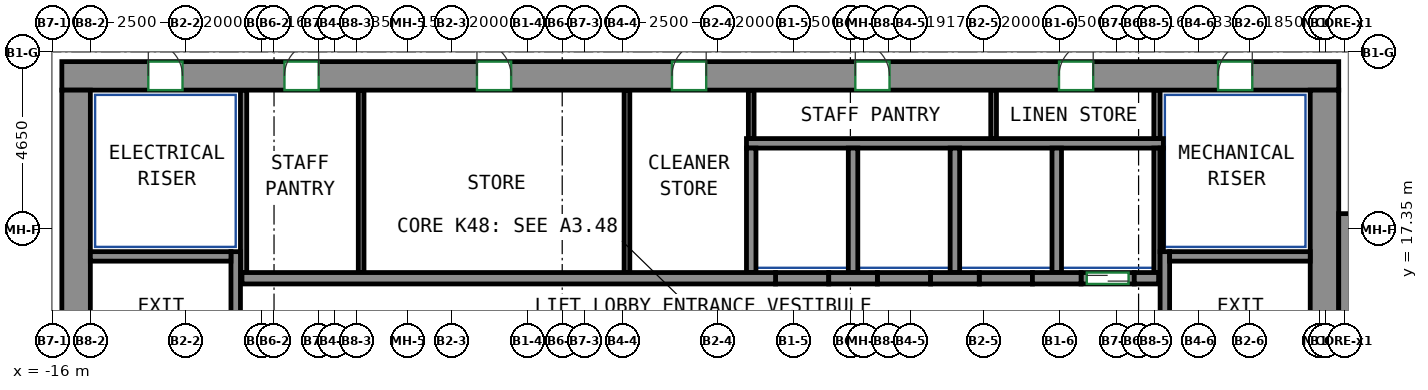
"""IFC4 building model, lengths in metres.
Left out: names, types, materials, properties, quantities, classifications, styles, units other than length and angle.
Written with IfcOpenShell. Run it as: python <this file> out.ifc"""

import sys

from ifc_helpers import new_model, si_unit, direction, frame, frame_2d, origin, place, context, subcontext, project, spatial, rectangle, extrude, source, transform, mapped, element, fill, save


model = new_model("IFC4")
c1 = context("Model", 3, precision=1e-05, world=origin(), true_north=direction((0.0, 1.0)))
c2 = subcontext(c1, "Body", "Model", "MODEL_VIEW")
j1 = project(units=[si_unit("LENGTHUNIT", "METRE"), si_unit("PLANEANGLEUNIT", "RADIAN")], contexts=[c1])
p1 = place(None, origin())
s1 = spatial("IfcSite", under=j1, at=p1, CompositionType="ELEMENT")
p2 = place(p1, origin())
s2 = spatial("IfcBuilding", under=s1, at=p2, CompositionType="ELEMENT")
p3 = place(p2, frame((0.0, 0.0, 195.7)))
s3 = spatial("IfcBuildingStorey", under=s2, at=p3, CompositionType="ELEMENT", Elevation=195.7)
m1 = source(origin(), c2, "Body", "SweptSolid", [
    extrude(rectangle(XDim=33.6, YDim=0.75, at=frame_2d((16.8, 0.0))), origin(), (0.0, 0.0, 1.0), 3.8),
])
p4 = place(p3, frame((-15.75, 21.375, 0.0), z_axis=(0.0, 0.0, 1.0), x_axis=(1.0, 0.0, 0.0)))
e1 = element("IfcWall", 1, at=p4, inside=s3, PredefinedType="SHEAR", context=c2, shape_type="MappedRepresentation", body=[
    mapped(m1, transform((0.0, 0.0, 0.0))),
])
p5 = place(p4, frame((5.858, 0.0, 0.0)))
e2 = element("IfcOpeningElement", 2, at=p5, cuts=e1, PredefinedType="OPENING", context=c2, shape_type="SweptSolid", body=[
    extrude(rectangle(XDim=0.9, YDim=2.1, at=frame_2d((0.45, 1.05))), frame((0.0, 0.385, 0.0), z_axis=(0.0, -1.0, 0.0), x_axis=(1.0, 0.0, 0.0)), (0.0, 0.0, 1.0), 0.77),
])
p6 = place(p4, frame((10.923, 0.0, 0.0)))
e3 = element("IfcOpeningElement", 3, at=p6, cuts=e1, PredefinedType="OPENING", context=c2, shape_type="SweptSolid", body=[
    extrude(rectangle(XDim=0.9, YDim=2.1, at=frame_2d((0.45, 1.05))), frame((0.0, 0.385, 0.0), z_axis=(0.0, -1.0, 0.0), x_axis=(1.0, 0.0, 0.0)), (0.0, 0.0, 1.0), 0.77),
])
p7 = place(p4, frame((16.055, 0.0, 0.0)))
e4 = element("IfcOpeningElement", 4, at=p7, cuts=e1, PredefinedType="OPENING", context=c2, shape_type="SweptSolid", body=[
    extrude(rectangle(XDim=0.9, YDim=2.1, at=frame_2d((0.45, 1.05))), frame((0.0, 0.385, 0.0), z_axis=(0.0, -1.0, 0.0), x_axis=(1.0, 0.0, 0.0)), (0.0, 0.0, 1.0), 0.77),
])
p8 = place(p4, frame((20.879, 0.0, 0.0)))
e5 = element("IfcOpeningElement", 5, at=p8, cuts=e1, PredefinedType="OPENING", context=c2, shape_type="SweptSolid", body=[
    extrude(rectangle(XDim=0.9, YDim=2.1, at=frame_2d((0.45, 1.05))), frame((0.0, 0.385, 0.0), z_axis=(0.0, -1.0, 0.0), x_axis=(1.0, 0.0, 0.0)), (0.0, 0.0, 1.0), 0.77),
])
p9 = place(p4, frame((26.239, 0.0, 0.0)))
e6 = element("IfcOpeningElement", 6, at=p9, cuts=e1, PredefinedType="OPENING", context=c2, shape_type="SweptSolid", body=[
    extrude(rectangle(XDim=0.9, YDim=2.1, at=frame_2d((0.45, 1.05))), frame((0.0, 0.385, 0.0), z_axis=(0.0, -1.0, 0.0), x_axis=(1.0, 0.0, 0.0)), (0.0, 0.0, 1.0), 0.77),
])
p10 = place(p4, frame((2.275, 0.0, 0.0)))
e7 = element("IfcOpeningElement", 7, at=p10, cuts=e1, PredefinedType="OPENING", context=c2, shape_type="SweptSolid", body=[
    extrude(rectangle(XDim=0.9, YDim=2.1, at=frame_2d((0.45, 1.05))), frame((0.0, 0.385, 0.0), z_axis=(0.0, -1.0, 0.0), x_axis=(1.0, 0.0, 0.0)), (0.0, 0.0, 1.0), 0.77),
])
p11 = place(p4, frame((30.425, 0.0, 0.0)))
e8 = element("IfcOpeningElement", 8, at=p11, cuts=e1, PredefinedType="OPENING", context=c2, shape_type="SweptSolid", body=[
    extrude(rectangle(XDim=0.9, YDim=2.1, at=frame_2d((0.45, 1.05))), frame((0.0, 0.385, 0.0), z_axis=(0.0, -1.0, 0.0), x_axis=(1.0, 0.0, 0.0)), (0.0, 0.0, 1.0), 0.77),
])
m2 = source(origin(), c2, "Body", "SweptSolid", [
    extrude(rectangle(XDim=12.0, YDim=0.75, at=frame_2d((6.0, 0.0))), origin(), (0.0, 0.0, 1.0), 3.8),
])
for number, where, z_axis, x_axis in (
    (9, (-15.375, 9.0, 0.0), (0.0, 0.0, 1.0), (0.0, 1.0, 0.0)),
    (10, (17.475, 9.0, 0.0), (0.0, 0.0, 1.0), (0.0, 1.0, 0.0)),
):
    element("IfcWall", number, at=place(p3, frame(where, z_axis=z_axis, x_axis=x_axis)), inside=s3, PredefinedType="SHEAR", context=c2, shape_type="MappedRepresentation", body=[
        mapped(m2, transform((0.0, 0.0, 0.0))),
    ])
m3 = source(origin(), c2, "Body", "SweptSolid", [
    extrude(rectangle(XDim=7.75, YDim=0.25, at=frame_2d((3.875, 0.0))), origin(), (0.0, 0.0, 1.0), 3.8),
])
p12 = place(p3, frame((-11.175, 9.0, 0.0), z_axis=(0.0, 0.0, 1.0), x_axis=(0.0, 1.0, 0.0)))
e11 = element("IfcWall", 11, at=p12, inside=s3, PredefinedType="SHEAR", context=c2, shape_type="MappedRepresentation", body=[
    mapped(m3, transform((0.0, 0.0, 0.0))),
])
m4 = source(origin(), c2, "Body", "SweptSolid", [
    extrude(rectangle(XDim=3.7, YDim=0.25, at=frame_2d((1.85, 0.0))), origin(), (0.0, 0.0, 1.0), 3.8),
])
p13 = place(p3, frame((-15.0, 16.625, 0.0), z_axis=(0.0, 0.0, 1.0), x_axis=(1.0, 0.0, 0.0)))
e12 = element("IfcWall", 12, at=p13, inside=s3, PredefinedType="SHEAR", context=c2, shape_type="MappedRepresentation", body=[
    mapped(m4, transform((0.0, 0.0, 0.0))),
])
p14 = place(p3, frame((13.275, 9.0, 0.0), z_axis=(0.0, 0.0, 1.0), x_axis=(0.0, 1.0, 0.0)))
e13 = element("IfcWall", 13, at=p14, inside=s3, PredefinedType="SHEAR", context=c2, shape_type="MappedRepresentation", body=[
    mapped(m3, transform((0.0, 0.0, 0.0))),
])
m5 = source(origin(), c2, "Body", "SweptSolid", [
    extrude(rectangle(XDim=3.7, YDim=0.25, at=frame_2d((1.85, 0.0))), origin(), (0.0, 0.0, 1.0), 3.8),
])
p15 = place(p3, frame((13.4, 16.625, 0.0), z_axis=(0.0, 0.0, 1.0), x_axis=(1.0, 0.0, 0.0)))
e14 = element("IfcWall", 14, at=p15, inside=s3, PredefinedType="SHEAR", context=c2, shape_type="MappedRepresentation", body=[
    mapped(m5, transform((0.0, 0.0, 0.0))),
])
m6 = source(origin(), c2, "Body", "SweptSolid", [
    extrude(rectangle(XDim=8.0, YDim=0.5, at=frame_2d((4.0, 0.0))), origin(), (0.0, 0.0, 1.0), 3.8),
])
p16 = place(p3, frame((18.1, 9.75, 0.0), z_axis=(0.0, 0.0, 1.0), x_axis=(0.0, 1.0, 0.0)))
e15 = element("IfcWall", 15, at=p16, inside=s3, PredefinedType="SHEAR", context=c2, shape_type="MappedRepresentation", body=[
    mapped(m6, transform((0.0, 0.0, 0.0))),
])
m7 = source(origin(), c2, "Body", "SweptSolid", [
    extrude(rectangle(XDim=14.04, YDim=0.3, at=frame_2d((7.02, 0.0))), origin(), (0.0, 0.0, 1.0), 3.8),
])
p17 = place(p3, frame((-11.01, 16.05, 0.0), z_axis=(0.0, 0.0, 1.0), x_axis=(1.0, 0.0, 0.0)))
e16 = element("IfcWall", 16, at=p17, inside=s3, PredefinedType="SHEAR", context=c2, shape_type="MappedRepresentation", body=[
    mapped(m7, transform((0.0, 0.0, 0.0))),
])
m8 = source(origin(), c2, "Body", "SweptSolid", [
    extrude(rectangle(XDim=1.28, YDim=0.3, at=frame_2d((0.64, 0.0))), origin(), (0.0, 0.0, 1.0), 3.8),
])
p18 = place(p3, frame((4.43, 16.05, 0.0), z_axis=(0.0, 0.0, 1.0), x_axis=(1.0, 0.0, 0.0)))
e17 = element("IfcWall", 17, at=p18, inside=s3, PredefinedType="SHEAR", context=c2, shape_type="MappedRepresentation", body=[
    mapped(m8, transform((0.0, 0.0, 0.0))),
])
m9 = source(origin(), c2, "Body", "SweptSolid", [
    extrude(rectangle(XDim=1.28, YDim=0.3, at=frame_2d((0.64, 0.0))), origin(), (0.0, 0.0, 1.0), 3.8),
])
p19 = place(p3, frame((7.11, 16.05, 0.0), z_axis=(0.0, 0.0, 1.0), x_axis=(1.0, 0.0, 0.0)))
e18 = element("IfcWall", 18, at=p19, inside=s3, PredefinedType="SHEAR", context=c2, shape_type="MappedRepresentation", body=[
    mapped(m9, transform((0.0, 0.0, 0.0))),
])
p20 = place(p3, frame((9.79, 16.05, 0.0), z_axis=(0.0, 0.0, 1.0), x_axis=(1.0, 0.0, 0.0)))
e19 = element("IfcWall", 19, at=p20, inside=s3, PredefinedType="SHEAR", context=c2, shape_type="MappedRepresentation", body=[
    mapped(m8, transform((0.0, 0.0, 0.0))),
])
m10 = source(origin(), c2, "Body", "SweptSolid", [
    extrude(rectangle(XDim=0.64, YDim=0.3, at=frame_2d((0.32, 0.0))), origin(), (0.0, 0.0, 1.0), 3.8),
])
p21 = place(p3, frame((12.47, 16.05, 0.0), z_axis=(0.0, 0.0, 1.0), x_axis=(1.0, 0.0, 0.0)))
e20 = element("IfcWall", 20, at=p21, inside=s3, PredefinedType="SHEAR", context=c2, shape_type="MappedRepresentation", body=[
    mapped(m10, transform((0.0, 0.0, 0.0))),
])
m11 = source(origin(), c2, "Body", "SweptSolid", [
    extrude(rectangle(XDim=1.4, YDim=0.3, at=frame_2d((0.7, 0.0))), origin(), (0.0, 0.0, 1.0), 3.8),
])
p22 = place(p3, frame((11.07, 16.05, 0.0), z_axis=(0.0, 0.0, 1.0), x_axis=(1.0, 0.0, 0.0)))
e21 = element("IfcWall", 21, at=p22, inside=s3, PredefinedType="PARTITIONING", context=c2, shape_type="MappedRepresentation", body=[
    mapped(m11, transform((0.0, 0.0, 0.0))),
])
p23 = place(p22, frame((0.15, 0.0, 0.0)))
e22 = element("IfcOpeningElement", 22, at=p23, cuts=e21, PredefinedType="OPENING", context=c2, shape_type="SweptSolid", body=[
    extrude(rectangle(XDim=1.1, YDim=2.1, at=frame_2d((0.55, 1.05))), frame((0.0, 0.16, 0.0), z_axis=(0.0, -1.0, 0.0), x_axis=(1.0, 0.0, 0.0)), (0.0, 0.0, 1.0), 0.32),
])
p24 = place(p3, frame((3.03, 16.05, 0.0), z_axis=(0.0, 0.0, 1.0), x_axis=(1.0, 0.0, 0.0)))
e23 = element("IfcWall", 23, at=p24, inside=s3, PredefinedType="PARTITIONING", context=c2, shape_type="MappedRepresentation", body=[
    mapped(m11, transform((0.0, 0.0, 0.0))),
])
m12 = source(origin(), c2, "Body", "SweptSolid", [
    extrude(rectangle(XDim=1.4, YDim=0.3, at=frame_2d((0.7, 0.0))), origin(), (0.0, 0.0, 1.0), 3.8),
])
for number, where, z_axis, x_axis in (
    (24, (5.71, 16.05, 0.0), (0.0, 0.0, 1.0), (1.0, 0.0, 0.0)),
    (25, (8.39, 16.05, 0.0), (0.0, 0.0, 1.0), (1.0, 0.0, 0.0)),
):
    element("IfcWall", number, at=place(p3, frame(where, z_axis=z_axis, x_axis=x_axis)), inside=s3, PredefinedType="PARTITIONING", context=c2, shape_type="MappedRepresentation", body=[
        mapped(m12, transform((0.0, 0.0, 0.0))),
    ])
m13 = source(origin(), c2, "Body", "SweptSolid", [
    extrude(rectangle(XDim=10.97, YDim=0.25, at=frame_2d((5.485, 0.0))), origin(), (0.0, 0.0, 1.0), 3.8),
])
p25 = place(p3, frame((2.265, 19.6, 0.0), z_axis=(0.0, 0.0, 1.0), x_axis=(1.0, 0.0, 0.0)))
e26 = element("IfcWall", 26, at=p25, inside=s3, PredefinedType="PARTITIONING", context=c2, shape_type="MappedRepresentation", body=[
    mapped(m13, transform((0.0, 0.0, 0.0))),
])
m14 = source(origin(), c2, "Body", "SweptSolid", [
    extrude(rectangle(XDim=3.275, YDim=0.165, at=frame_2d((1.638, 0.0))), origin(), (0.0, 0.0, 1.0), 3.8),
])
p26 = place(p3, frame((13.067, 16.2, 0.0), z_axis=(0.0, 0.0, 1.0), x_axis=(0.0, 1.0, 0.0)))
e27 = element("IfcWall", 27, at=p26, inside=s3, PredefinedType="PARTITIONING", context=c2, shape_type="MappedRepresentation", body=[
    mapped(m14, transform((0.0, 0.0, 0.0))),
])
m15 = source(origin(), c2, "Body", "SweptSolid", [
    extrude(rectangle(XDim=1.275, YDim=0.165, at=frame_2d((0.637, 0.0))), origin(), (0.0, 0.0, 1.0), 3.8),
])
p27 = place(p3, frame((13.067, 19.725, 0.0), z_axis=(0.0, 0.0, 1.0), x_axis=(0.0, 1.0, 0.0)))
e28 = element("IfcWall", 28, at=p27, inside=s3, PredefinedType="PARTITIONING", context=c2, shape_type="MappedRepresentation", body=[
    mapped(m15, transform((0.0, 0.0, 0.0))),
])
m16 = source(origin(), c2, "Body", "SweptSolid", [
    extrude(rectangle(XDim=4.8, YDim=0.165, at=frame_2d((2.4, 0.0))), origin(), (0.0, 0.0, 1.0), 3.8),
])
p28 = place(p3, frame((-10.968, 16.2, 0.0), z_axis=(0.0, 0.0, 1.0), x_axis=(0.0, 1.0, 0.0)))
e29 = element("IfcWall", 29, at=p28, inside=s3, PredefinedType="PARTITIONING", context=c2, shape_type="MappedRepresentation", body=[
    mapped(m16, transform((0.0, 0.0, 0.0))),
])
m17 = source(origin(), c2, "Body", "SweptSolid", [
    extrude(rectangle(XDim=3.275, YDim=0.25, at=frame_2d((1.638, 0.0))), origin(), (0.0, 0.0, 1.0), 3.8),
])
p29 = place(p3, frame((10.43, 16.2, 0.0), z_axis=(0.0, 0.0, 1.0), x_axis=(0.0, 1.0, 0.0)))
e30 = element("IfcWall", 30, at=p29, inside=s3, PredefinedType="PARTITIONING", context=c2, shape_type="MappedRepresentation", body=[
    mapped(m17, transform((0.0, 0.0, 0.0))),
])
m18 = source(origin(), c2, "Body", "SweptSolid", [
    extrude(rectangle(XDim=2.725, YDim=0.085, at=frame_2d((1.363, 0.0))), origin(), (0.0, 0.0, 1.0), 3.8),
])
p30 = place(p3, frame((13.192, 16.75, 0.0), z_axis=(0.0, 0.0, 1.0), x_axis=(0.0, 1.0, 0.0)))
e31 = element("IfcWall", 31, at=p30, inside=s3, PredefinedType="PARTITIONING", context=c2, shape_type="MappedRepresentation", body=[
    mapped(m18, transform((0.0, 0.0, 0.0))),
])
for number, where, z_axis, x_axis in (
    (32, (2.39, 16.2, 0.0), (0.0, 0.0, 1.0), (0.0, 1.0, 0.0)),
    (33, (5.07, 16.2, 0.0), (0.0, 0.0, 1.0), (0.0, 1.0, 0.0)),
    (34, (7.75, 16.2, 0.0), (0.0, 0.0, 1.0), (0.0, 1.0, 0.0)),
):
    element("IfcWall", number, at=place(p3, frame(where, z_axis=z_axis, x_axis=x_axis)), inside=s3, PredefinedType="PARTITIONING", context=c2, shape_type="MappedRepresentation", body=[
        mapped(m17, transform((0.0, 0.0, 0.0))),
    ])
m19 = source(origin(), c2, "Body", "SweptSolid", [
    extrude(rectangle(XDim=4.8, YDim=0.15, at=frame_2d((2.4, 0.0))), origin(), (0.0, 0.0, 1.0), 3.8),
])
for number, where, z_axis, x_axis in (
    (35, (-7.875, 16.2, 0.0), (0.0, 0.0, 1.0), (0.0, 1.0, 0.0)),
    (36, (-0.88, 16.2, 0.0), (0.0, 0.0, 1.0), (0.0, 1.0, 0.0)),
):
    element("IfcWall", number, at=place(p3, frame(where, z_axis=z_axis, x_axis=x_axis)), inside=s3, PredefinedType="PARTITIONING", context=c2, shape_type="MappedRepresentation", body=[
        mapped(m19, transform((0.0, 0.0, 0.0))),
    ])
m20 = source(origin(), c2, "Body", "SweptSolid", [
    extrude(rectangle(XDim=1.275, YDim=0.15, at=frame_2d((0.637, 0.0))), origin(), (0.0, 0.0, 1.0), 3.8),
])
for number, where, z_axis, x_axis in (
    (37, (2.39, 19.725, 0.0), (0.0, 0.0, 1.0), (0.0, 1.0, 0.0)),
    (38, (8.768, 19.725, 0.0), (0.0, 0.0, 1.0), (0.0, 1.0, 0.0)),
):
    element("IfcWall", number, at=place(p3, frame(where, z_axis=z_axis, x_axis=x_axis)), inside=s3, PredefinedType="PARTITIONING", context=c2, shape_type="MappedRepresentation", body=[
        mapped(m20, transform((0.0, 0.0, 0.0))),
    ])
p31 = place(p23, origin())
e39 = element("IfcDoor", 39, at=p31, inside=s3, OperationType="DOUBLE_DOOR_SLIDING", PredefinedType="DOOR", context=c2, shape_type="SweptSolid", body=[
    extrude(rectangle(XDim=1.1, YDim=2.1, at=frame_2d((0.55, 1.05))), frame((0.0, 0.025, 0.0), z_axis=(0.0, -1.0, 0.0), x_axis=(1.0, 0.0, 0.0)), (0.0, 0.0, 1.0), 0.05),
])
fill(e22, e39)
p32 = place(p5, origin())
e40 = element("IfcDoor", 40, at=p32, inside=s3, OperationType="SINGLE_SWING_RIGHT", PredefinedType="DOOR", context=c2, shape_type="SweptSolid", body=[
    extrude(rectangle(XDim=0.9, YDim=2.1, at=frame_2d((0.45, 1.05))), frame((0.0, -0.23, 0.0), z_axis=(0.0, -1.0, 0.0), x_axis=(1.0, 0.0, 0.0)), (0.0, 0.0, 1.0), 0.05),
])
fill(e2, e40)
p33 = place(p6, origin())
e41 = element("IfcDoor", 41, at=p33, inside=s3, OperationType="SINGLE_SWING_LEFT", PredefinedType="DOOR", context=c2, shape_type="SweptSolid", body=[
    extrude(rectangle(XDim=0.9, YDim=2.1, at=frame_2d((0.45, 1.05))), frame((0.0, -0.23, 0.0), z_axis=(0.0, -1.0, 0.0), x_axis=(1.0, 0.0, 0.0)), (0.0, 0.0, 1.0), 0.05),
])
fill(e3, e41)
p34 = place(p7, origin())
e42 = element("IfcDoor", 42, at=p34, inside=s3, OperationType="SINGLE_SWING_RIGHT", PredefinedType="DOOR", context=c2, shape_type="SweptSolid", body=[
    extrude(rectangle(XDim=0.9, YDim=2.1, at=frame_2d((0.45, 1.05))), frame((0.0, -0.23, 0.0), z_axis=(0.0, -1.0, 0.0), x_axis=(1.0, 0.0, 0.0)), (0.0, 0.0, 1.0), 0.05),
])
fill(e4, e42)
p35 = place(p8, origin())
e43 = element("IfcDoor", 43, at=p35, inside=s3, OperationType="SINGLE_SWING_LEFT", PredefinedType="DOOR", context=c2, shape_type="SweptSolid", body=[
    extrude(rectangle(XDim=0.9, YDim=2.1, at=frame_2d((0.45, 1.05))), frame((0.0, -0.23, 0.0), z_axis=(0.0, -1.0, 0.0), x_axis=(1.0, 0.0, 0.0)), (0.0, 0.0, 1.0), 0.05),
])
fill(e5, e43)
p36 = place(p9, origin())
e44 = element("IfcDoor", 44, at=p36, inside=s3, OperationType="SINGLE_SWING_RIGHT", PredefinedType="DOOR", context=c2, shape_type="SweptSolid", body=[
    extrude(rectangle(XDim=0.9, YDim=2.1, at=frame_2d((0.45, 1.05))), frame((0.0, -0.23, 0.0), z_axis=(0.0, -1.0, 0.0), x_axis=(1.0, 0.0, 0.0)), (0.0, 0.0, 1.0), 0.05),
])
fill(e6, e44)
p37 = place(p10, origin())
e45 = element("IfcDoor", 45, at=p37, inside=s3, OperationType="SINGLE_SWING_LEFT", PredefinedType="DOOR", context=c2, shape_type="SweptSolid", body=[
    extrude(rectangle(XDim=0.9, YDim=2.1, at=frame_2d((0.45, 1.05))), frame((0.0, -0.23, 0.0), z_axis=(0.0, -1.0, 0.0), x_axis=(1.0, 0.0, 0.0)), (0.0, 0.0, 1.0), 0.05),
])
fill(e7, e45)
p38 = place(p11, origin())
e46 = element("IfcDoor", 46, at=p38, inside=s3, OperationType="SINGLE_SWING_RIGHT", PredefinedType="DOOR", context=c2, shape_type="SweptSolid", body=[
    extrude(rectangle(XDim=0.9, YDim=2.1, at=frame_2d((0.45, 1.05))), frame((0.0, -0.23, 0.0), z_axis=(0.0, -1.0, 0.0), x_axis=(1.0, 0.0, 0.0)), (0.0, 0.0, 1.0), 0.05),
])
fill(e8, e46)
save(model, sys.argv[1])
